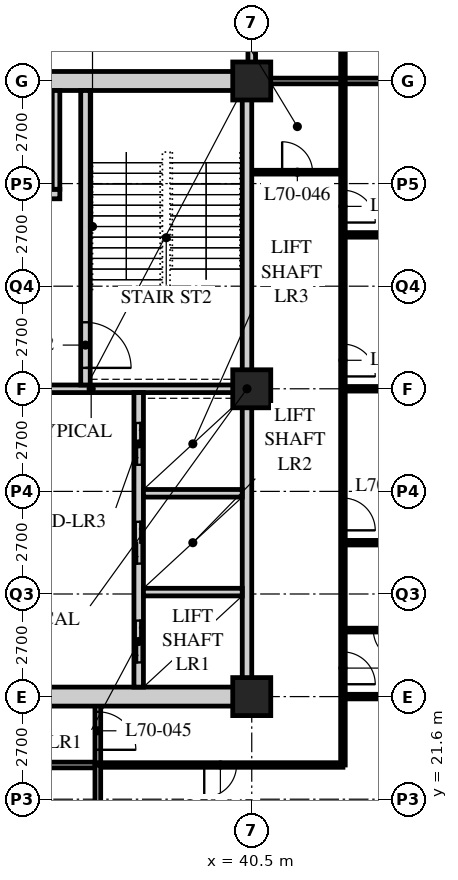
"""IFC4 building model, lengths in metres.
Left out: names, types, materials, properties, quantities, classifications, styles, units other than length and angle.
Written with IfcOpenShell. Run it as: python <this file> out.ifc"""

import sys

from ifc_helpers import new_model, si_unit, direction, frame, frame_2d, origin, origin_2d, place, context, subcontext, project, spatial, rectangle, hollow_rectangle, extrude, element, fill, save


model = new_model("IFC4")
c1 = context("Model", 3, precision=1e-05, world=origin(), true_north=direction((0.0, 1.0)))
c2 = subcontext(c1, "Body", "Model", "MODEL_VIEW")
j1 = project(units=[si_unit("LENGTHUNIT", "METRE"), si_unit("PLANEANGLEUNIT", "RADIAN")], contexts=[c1])
p1 = place(None, origin())
s1 = spatial("IfcSite", under=j1, at=p1, CompositionType="ELEMENT")
p2 = place(p1, origin())
s2 = spatial("IfcBuilding", under=s1, at=p2, CompositionType="ELEMENT")
p3 = place(p2, frame((0.0, 0.0, 273.6)))
s3 = spatial("IfcBuildingStorey", under=s2, at=p3, CompositionType="ELEMENT", Elevation=273.6)
for number, where, z_axis, x_axis in (
    (1, (40.5, 24.3, 0.0), (0.0, 0.0, 1.0), (1.0, 0.0, 0.0)),
    (2, (40.5, 32.4, 0.0), (0.0, 0.0, 1.0), (1.0, 0.0, 0.0)),
    (3, (40.5, 40.5, 0.0), (0.0, 0.0, 1.0), (1.0, 0.0, 0.0)),
):
    element("IfcColumn", number, at=place(p3, frame(where, z_axis=z_axis, x_axis=x_axis)), inside=s3, PredefinedType="COLUMN", context=c2, shape_type="SweptSolid", body=[
        extrude(hollow_rectangle(XDim=1.0, YDim=1.0, WallThickness=0.1, at=origin_2d()), origin(), (0.0, 0.0, 1.0), 3.9),
    ])
p4 = place(p3, frame((12.15, 22.5, 0.0), z_axis=(0.0, 0.0, 1.0), x_axis=(1.0, 0.0, 0.0)))
e4 = element("IfcWall", 4, at=p4, inside=s3, PredefinedType="PARTITIONING", context=c2, shape_type="SweptSolid", body=[
    extrude(rectangle(XDim=24.3, YDim=0.15, at=frame_2d((12.15, 0.0))), origin(), (0.0, 0.0, 1.0), 3.69),
])
p5 = place(p4, frame((4.45, 0.0, 0.0)))
e5 = element("IfcOpeningElement", 5, at=p5, cuts=e4, PredefinedType="OPENING", context=c2, shape_type="SweptSolid", body=[
    extrude(rectangle(XDim=1.0, YDim=2.1, at=frame_2d((0.5, 1.05))), frame((0.0, 0.085, 0.0), z_axis=(0.0, -1.0, 0.0), x_axis=(1.0, 0.0, 0.0)), (0.0, 0.0, 1.0), 0.17),
])
p6 = place(p4, frame((12.55, 0.0, 0.0)))
e6 = element("IfcOpeningElement", 6, at=p6, cuts=e4, PredefinedType="OPENING", context=c2, shape_type="SweptSolid", body=[
    extrude(rectangle(XDim=1.0, YDim=2.1, at=frame_2d((0.5, 1.05))), frame((0.0, 0.085, 0.0), z_axis=(0.0, -1.0, 0.0), x_axis=(1.0, 0.0, 0.0)), (0.0, 0.0, 1.0), 0.17),
])
p7 = place(p4, frame((2.625, 0.0, 0.0)))
e7 = element("IfcOpeningElement", 7, at=p7, cuts=e4, PredefinedType="OPENING", context=c2, shape_type="SweptSolid", body=[
    extrude(rectangle(XDim=1.0, YDim=2.1, at=frame_2d((0.5, 1.05))), frame((0.0, 0.085, 0.0), z_axis=(0.0, -1.0, 0.0), x_axis=(1.0, 0.0, 0.0)), (0.0, 0.0, 1.0), 0.17),
])
p8 = place(p3, frame((36.45, 22.5, 0.0), z_axis=(0.0, 0.0, 1.0), x_axis=(0.0, 1.0, 0.0)))
e8 = element("IfcWall", 8, at=p8, inside=s3, PredefinedType="PARTITIONING", context=c2, shape_type="SweptSolid", body=[
    extrude(rectangle(XDim=1.8, YDim=0.15, at=frame_2d((0.9, 0.0))), origin(), (0.0, 0.0, 1.0), 3.69),
])
p9 = place(p8, frame((0.4, 0.0, 0.0)))
e9 = element("IfcOpeningElement", 9, at=p9, cuts=e8, PredefinedType="OPENING", context=c2, shape_type="SweptSolid", body=[
    extrude(rectangle(XDim=1.0, YDim=2.1, at=frame_2d((0.5, 1.05))), frame((0.0, 0.085, 0.0), z_axis=(0.0, -1.0, 0.0), x_axis=(1.0, 0.0, 0.0)), (0.0, 0.0, 1.0), 0.17),
])
p10 = place(p3, frame((40.5, 40.5, 0.0), z_axis=(0.0, 0.0, 1.0), x_axis=(0.0, 1.0, 0.0)))
e10 = element("IfcWall", 10, at=p10, inside=s3, PredefinedType="SOLIDWALL", context=c2, shape_type="SweptSolid", body=[
    extrude(rectangle(XDim=10.35, YDim=0.2, at=frame_2d((5.175, 0.0))), origin(), (0.0, 0.0, 1.0), 3.078),
])
p11 = place(p3, frame((40.5, 38.1, 0.0), z_axis=(0.0, 0.0, 1.0), x_axis=(1.0, 0.0, 0.0)))
e11 = element("IfcWall", 11, at=p11, inside=s3, PredefinedType="PARTITIONING", context=c2, shape_type="SweptSolid", body=[
    extrude(rectangle(XDim=2.4, YDim=0.1, at=frame_2d((1.2, 0.0))), origin(), (0.0, 0.0, 1.0), 3.69),
])
p12 = place(p11, frame((0.8, 0.0, 0.0)))
e12 = element("IfcOpeningElement", 12, at=p12, cuts=e11, PredefinedType="OPENING", context=c2, shape_type="SweptSolid", body=[
    extrude(rectangle(XDim=0.8, YDim=2.1, at=frame_2d((0.4, 1.05))), frame((0.0, 0.06, 0.0), z_axis=(0.0, -1.0, 0.0), x_axis=(1.0, 0.0, 0.0)), (0.0, 0.0, 1.0), 0.12),
])
p13 = place(p3, frame((42.9, 22.5, 0.0), z_axis=(0.0, 0.0, 1.0), x_axis=(0.0, 1.0, 0.0)))
e13 = element("IfcWall", 13, at=p13, inside=s3, PredefinedType="PARTITIONING", context=c2, shape_type="SweptSolid", body=[
    extrude(rectangle(XDim=18.0, YDim=0.12, at=frame_2d((9.0, 0.0))), origin(), (0.0, 0.0, 1.0), 3.69),
])
p14 = place(p13, frame((2.125, 0.0, 0.0)))
e14 = element("IfcOpeningElement", 14, at=p14, cuts=e13, PredefinedType="OPENING", context=c2, shape_type="SweptSolid", body=[
    extrude(rectangle(XDim=0.85, YDim=2.1, at=frame_2d((0.425, 1.05))), frame((0.0, 0.07, 0.0), z_axis=(0.0, -1.0, 0.0), x_axis=(1.0, 0.0, 0.0)), (0.0, 0.0, 1.0), 0.14),
])
p15 = place(p13, frame((6.175, 0.0, 0.0)))
e15 = element("IfcOpeningElement", 15, at=p15, cuts=e13, PredefinedType="OPENING", context=c2, shape_type="SweptSolid", body=[
    extrude(rectangle(XDim=0.85, YDim=2.1, at=frame_2d((0.425, 1.05))), frame((0.0, 0.07, 0.0), z_axis=(0.0, -1.0, 0.0), x_axis=(1.0, 0.0, 0.0)), (0.0, 0.0, 1.0), 0.14),
])
p16 = place(p13, frame((10.225, 0.0, 0.0)))
e16 = element("IfcOpeningElement", 16, at=p16, cuts=e13, PredefinedType="OPENING", context=c2, shape_type="SweptSolid", body=[
    extrude(rectangle(XDim=0.85, YDim=2.1, at=frame_2d((0.425, 1.05))), frame((0.0, 0.07, 0.0), z_axis=(0.0, -1.0, 0.0), x_axis=(1.0, 0.0, 0.0)), (0.0, 0.0, 1.0), 0.14),
])
p17 = place(p13, frame((14.275, 0.0, 0.0)))
e17 = element("IfcOpeningElement", 17, at=p17, cuts=e13, PredefinedType="OPENING", context=c2, shape_type="SweptSolid", body=[
    extrude(rectangle(XDim=0.85, YDim=2.1, at=frame_2d((0.425, 1.05))), frame((0.0, 0.07, 0.0), z_axis=(0.0, -1.0, 0.0), x_axis=(1.0, 0.0, 0.0)), (0.0, 0.0, 1.0), 0.14),
])
p18 = place(p3, frame((36.45, 22.5, 0.0), z_axis=(0.0, 0.0, 1.0), x_axis=(1.0, 0.0, 0.0)))
e18 = element("IfcWall", 18, at=p18, inside=s3, PredefinedType="PARTITIONING", context=c2, shape_type="SweptSolid", body=[
    extrude(rectangle(XDim=6.45, YDim=0.12, at=frame_2d((3.225, 0.0))), origin(), (0.0, 0.0, 1.0), 3.69),
])
p19 = place(p18, frame((2.8, 0.0, 0.0)))
e19 = element("IfcOpeningElement", 19, at=p19, cuts=e18, PredefinedType="OPENING", context=c2, shape_type="SweptSolid", body=[
    extrude(rectangle(XDim=0.85, YDim=2.1, at=frame_2d((0.425, 1.05))), frame((0.0, 0.07, 0.0), z_axis=(0.0, -1.0, 0.0), x_axis=(1.0, 0.0, 0.0)), (0.0, 0.0, 1.0), 0.14),
])
p20 = place(p3, frame((42.9, 24.3, 0.0), z_axis=(0.0, 0.0, 1.0), x_axis=(1.0, 0.0, 0.0)))
e20 = element("IfcWall", 20, at=p20, inside=s3, PredefinedType="PARTITIONING", context=c2, shape_type="SweptSolid", body=[
    extrude(rectangle(XDim=9.45, YDim=0.12, at=frame_2d((4.725, 0.0))), origin(), (0.0, 0.0, 1.0), 3.078),
])
p21 = place(p3, frame((40.5, 40.5, 0.0), z_axis=(0.0, 0.0, 1.0), x_axis=(1.0, 0.0, 0.0)))
e21 = element("IfcWall", 21, at=p21, inside=s3, PredefinedType="PARTITIONING", context=c2, shape_type="SweptSolid", body=[
    extrude(rectangle(XDim=15.9, YDim=0.15, at=frame_2d((7.95, 0.0))), origin(), (0.0, 0.0, 1.0), 3.078),
])
p22 = place(p3, frame((36.45, 16.5, 0.0), z_axis=(0.0, 0.0, 1.0), x_axis=(0.0, 1.0, 0.0)))
e22 = element("IfcWall", 22, at=p22, inside=s3, PredefinedType="PARTITIONING", context=c2, shape_type="SweptSolid", body=[
    extrude(rectangle(XDim=6.0, YDim=0.15, at=frame_2d((3.0, 0.0))), origin(), (0.0, 0.0, 1.0), 3.69),
])
p23 = place(p3, frame((42.9, 26.05, 0.0), z_axis=(0.0, 0.0, 1.0), x_axis=(1.0, 0.0, 0.0)))
e23 = element("IfcWall", 23, at=p23, inside=s3, PredefinedType="PARTITIONING", context=c2, shape_type="SweptSolid", body=[
    extrude(rectangle(XDim=2.4, YDim=0.1, at=frame_2d((1.2, 0.0))), origin(), (0.0, 0.0, 1.0), 3.69),
])
p24 = place(p23, frame((0.8, 0.0, 0.0)))
e24 = element("IfcOpeningElement", 24, at=p24, cuts=e23, PredefinedType="OPENING", context=c2, shape_type="SweptSolid", body=[
    extrude(rectangle(XDim=0.8, YDim=2.1, at=frame_2d((0.4, 1.05))), frame((0.0, 0.06, 0.0), z_axis=(0.0, -1.0, 0.0), x_axis=(1.0, 0.0, 0.0)), (0.0, 0.0, 1.0), 0.12),
])
p25 = place(p3, frame((42.9, 28.35, 0.0), z_axis=(0.0, 0.0, 1.0), x_axis=(1.0, 0.0, 0.0)))
e25 = element("IfcWall", 25, at=p25, inside=s3, PredefinedType="PARTITIONING", context=c2, shape_type="SweptSolid", body=[
    extrude(rectangle(XDim=13.5, YDim=0.12, at=frame_2d((6.75, 0.0))), origin(), (0.0, 0.0, 1.0), 3.69),
])
p26 = place(p3, frame((42.9, 32.4, 0.0), z_axis=(0.0, 0.0, 1.0), x_axis=(1.0, 0.0, 0.0)))
e26 = element("IfcWall", 26, at=p26, inside=s3, PredefinedType="PARTITIONING", context=c2, shape_type="SweptSolid", body=[
    extrude(rectangle(XDim=13.5, YDim=0.12, at=frame_2d((6.75, 0.0))), origin(), (0.0, 0.0, 1.0), 3.078),
])
p27 = place(p3, frame((42.9, 36.45, 0.0), z_axis=(0.0, 0.0, 1.0), x_axis=(1.0, 0.0, 0.0)))
e27 = element("IfcWall", 27, at=p27, inside=s3, PredefinedType="PARTITIONING", context=c2, shape_type="SweptSolid", body=[
    extrude(rectangle(XDim=13.5, YDim=0.12, at=frame_2d((6.75, 0.0))), origin(), (0.0, 0.0, 1.0), 3.69),
])
p28 = place(p3, frame((42.9, 52.65, 0.0), z_axis=(0.0, 0.0, 1.0), x_axis=(0.0, -1.0, 0.0)))
e28 = element("IfcWall", 28, at=p28, inside=s3, PredefinedType="PARTITIONING", context=c2, shape_type="SweptSolid", body=[
    extrude(rectangle(XDim=12.15, YDim=0.12, at=frame_2d((6.075, 0.0))), origin(), (0.0, 0.0, 1.0), 3.69),
])
p29 = place(p28, frame((2.125, 0.0, 0.0)))
e29 = element("IfcOpeningElement", 29, at=p29, cuts=e28, PredefinedType="OPENING", context=c2, shape_type="SweptSolid", body=[
    extrude(rectangle(XDim=0.85, YDim=2.1, at=frame_2d((0.425, 1.05))), frame((0.0, 0.07, 0.0), z_axis=(0.0, -1.0, 0.0), x_axis=(1.0, 0.0, 0.0)), (0.0, 0.0, 1.0), 0.14),
])
p30 = place(p28, frame((8.425, 0.0, 0.0)))
e30 = element("IfcOpeningElement", 30, at=p30, cuts=e28, PredefinedType="OPENING", context=c2, shape_type="SweptSolid", body=[
    extrude(rectangle(XDim=0.85, YDim=2.1, at=frame_2d((0.425, 1.05))), frame((0.0, 0.07, 0.0), z_axis=(0.0, -1.0, 0.0), x_axis=(1.0, 0.0, 0.0)), (0.0, 0.0, 1.0), 0.14),
])
p31 = place(p3, frame((15.95, 24.3, 0.0), z_axis=(0.0, 0.0, 1.0), x_axis=(1.0, 0.0, 0.0)))
e31 = element("IfcWall", 31, at=p31, inside=s3, PredefinedType="SOLIDWALL", context=c2, shape_type="SweptSolid", body=[
    extrude(rectangle(XDim=24.55, YDim=0.5, at=frame_2d((12.275, 0.0))), origin(), (0.0, 0.0, 1.0), 3.04),
])
p32 = place(p31, frame((11.5, 0.0, 0.0)))
e32 = element("IfcOpeningElement", 32, at=p32, cuts=e31, PredefinedType="OPENING", context=c2, shape_type="SweptSolid", body=[
    extrude(rectangle(XDim=1.8, YDim=2.4, at=frame_2d((0.9, 1.2))), frame((0.0, 0.26, 0.0), z_axis=(0.0, -1.0, 0.0), x_axis=(1.0, 0.0, 0.0)), (0.0, 0.0, 1.0), 0.52),
])
p33 = place(p3, frame((15.95, 40.5, 0.0), z_axis=(0.0, 0.0, 1.0), x_axis=(1.0, 0.0, 0.0)))
e33 = element("IfcWall", 33, at=p33, inside=s3, PredefinedType="SOLIDWALL", context=c2, shape_type="SweptSolid", body=[
    extrude(rectangle(XDim=24.55, YDim=0.5, at=frame_2d((12.275, 0.0))), origin(), (0.0, 0.0, 1.0), 3.04),
])
p34 = place(p33, frame((11.5, 0.0, 0.0)))
e34 = element("IfcOpeningElement", 34, at=p34, cuts=e33, PredefinedType="OPENING", context=c2, shape_type="SweptSolid", body=[
    extrude(rectangle(XDim=1.8, YDim=2.4, at=frame_2d((0.9, 1.2))), frame((0.0, 0.26, 0.0), z_axis=(0.0, -1.0, 0.0), x_axis=(1.0, 0.0, 0.0)), (0.0, 0.0, 1.0), 0.52),
])
p35 = place(p3, frame((40.375, 24.55, 0.0), z_axis=(0.0, 0.0, 1.0), x_axis=(0.0, 1.0, 0.0)))
e35 = element("IfcWall", 35, at=p35, inside=s3, PredefinedType="SOLIDWALL", context=c2, shape_type="SweptSolid", body=[
    extrude(rectangle(XDim=15.7, YDim=0.25, at=frame_2d((7.85, 0.0))), origin(), (0.0, 0.0, 1.0), 3.078),
])
p36 = place(p3, frame((32.3, 32.4, 0.0), z_axis=(0.0, 0.0, 1.0), x_axis=(1.0, 0.0, 0.0)))
e36 = element("IfcWall", 36, at=p36, inside=s3, PredefinedType="SOLIDWALL", context=c2, shape_type="SweptSolid", body=[
    extrude(rectangle(XDim=7.95, YDim=0.2, at=frame_2d((3.975, 0.0))), origin(), (0.0, 0.0, 1.0), 3.078),
])
p37 = place(p3, frame((37.525, 24.55, 0.0), z_axis=(0.0, 0.0, 1.0), x_axis=(0.0, 1.0, 0.0)))
e37 = element("IfcWall", 37, at=p37, inside=s3, PredefinedType="SOLIDWALL", context=c2, shape_type="SweptSolid", body=[
    extrude(rectangle(XDim=7.75, YDim=0.25, at=frame_2d((3.875, 0.0))), origin(), (0.0, 0.0, 1.0), 3.69),
])
p38 = place(p37, frame((0.65, 0.0, 0.0)))
e38 = element("IfcOpeningElement", 38, at=p38, cuts=e37, PredefinedType="OPENING", context=c2, shape_type="SweptSolid", body=[
    extrude(rectangle(XDim=1.1, YDim=2.4, at=frame_2d((0.55, 1.2))), frame((0.0, 0.135, 0.0), z_axis=(0.0, -1.0, 0.0), x_axis=(1.0, 0.0, 0.0)), (0.0, 0.0, 1.0), 0.27),
])
p39 = place(p37, frame((3.25, 0.0, 0.0)))
e39 = element("IfcOpeningElement", 39, at=p39, cuts=e37, PredefinedType="OPENING", context=c2, shape_type="SweptSolid", body=[
    extrude(rectangle(XDim=1.1, YDim=2.4, at=frame_2d((0.55, 1.2))), frame((0.0, 0.135, 0.0), z_axis=(0.0, -1.0, 0.0), x_axis=(1.0, 0.0, 0.0)), (0.0, 0.0, 1.0), 0.27),
])
p40 = place(p37, frame((5.85, 0.0, 0.0)))
e40 = element("IfcOpeningElement", 40, at=p40, cuts=e37, PredefinedType="OPENING", context=c2, shape_type="SweptSolid", body=[
    extrude(rectangle(XDim=1.1, YDim=2.4, at=frame_2d((0.55, 1.2))), frame((0.0, 0.135, 0.0), z_axis=(0.0, -1.0, 0.0), x_axis=(1.0, 0.0, 0.0)), (0.0, 0.0, 1.0), 0.27),
])
for number, where, z_axis, x_axis in (
    (41, (37.65, 27.05, 0.0), (0.0, 0.0, 1.0), (1.0, 0.0, 0.0)),
    (42, (37.65, 29.65, 0.0), (0.0, 0.0, 1.0), (1.0, 0.0, 0.0)),
):
    element("IfcWall", number, at=place(p3, frame(where, z_axis=z_axis, x_axis=x_axis)), inside=s3, PredefinedType="SOLIDWALL", context=c2, shape_type="SweptSolid", body=[
        extrude(rectangle(XDim=2.6, YDim=0.2, at=frame_2d((1.3, 0.0))), origin(), (0.0, 0.0, 1.0), 3.69),
    ])
p41 = place(p3, frame((36.125, 32.5, 0.0), z_axis=(0.0, 0.0, 1.0), x_axis=(0.0, 1.0, 0.0)))
e43 = element("IfcWall", 43, at=p41, inside=s3, PredefinedType="SOLIDWALL", context=c2, shape_type="SweptSolid", body=[
    extrude(rectangle(XDim=7.75, YDim=0.25, at=frame_2d((3.875, 0.0))), origin(), (0.0, 0.0, 1.0), 3.69),
])
p42 = place(p41, frame((0.45, 0.0, 0.0)))
e44 = element("IfcOpeningElement", 44, at=p42, cuts=e43, PredefinedType="OPENING", context=c2, shape_type="SweptSolid", body=[
    extrude(rectangle(XDim=1.2, YDim=2.1, at=frame_2d((0.6, 1.05))), frame((0.0, 0.135, 0.0), z_axis=(0.0, -1.0, 0.0), x_axis=(1.0, 0.0, 0.0)), (0.0, 0.0, 1.0), 0.27),
])
p43 = place(p3, frame((32.5, 37.525, 0.0), z_axis=(0.0, 0.0, 1.0), x_axis=(1.0, 0.0, 0.0)))
e45 = element("IfcWall", 45, at=p43, inside=s3, PredefinedType="SOLIDWALL", context=c2, shape_type="SweptSolid", body=[
    extrude(rectangle(XDim=2.95, YDim=0.25, at=frame_2d((1.475, 0.0))), origin(), (0.0, 0.0, 1.0), 3.69),
])
p44 = place(p43, frame((0.9, 0.0, 0.0)))
e46 = element("IfcOpeningElement", 46, at=p44, cuts=e45, PredefinedType="OPENING", context=c2, shape_type="SweptSolid", body=[
    extrude(rectangle(XDim=1.1, YDim=2.4, at=frame_2d((0.55, 1.2))), frame((0.0, 0.135, 0.0), z_axis=(0.0, -1.0, 0.0), x_axis=(1.0, 0.0, 0.0)), (0.0, 0.0, 1.0), 0.27),
])
p45 = place(p3, frame((35.35, 37.65, 0.0), z_axis=(0.0, 0.0, 1.0), x_axis=(0.0, 1.0, 0.0)))
e47 = element("IfcWall", 47, at=p45, inside=s3, PredefinedType="SOLIDWALL", context=c2, shape_type="SweptSolid", body=[
    extrude(rectangle(XDim=2.6, YDim=0.2, at=frame_2d((1.3, 0.0))), origin(), (0.0, 0.0, 1.0), 3.69),
])
p46 = place(p9, origin())
e48 = element("IfcDoor", 48, at=p46, inside=s3, OperationType="SINGLE_SWING_RIGHT", PredefinedType="DOOR", context=c2, shape_type="SweptSolid", body=[
    extrude(rectangle(XDim=1.0, YDim=2.1, at=frame_2d((0.5, 1.05))), frame((0.0, 0.025, 0.0), z_axis=(0.0, -1.0, 0.0), x_axis=(1.0, 0.0, 0.0)), (0.0, 0.0, 1.0), 0.05),
])
fill(e9, e48)
p47 = place(p12, origin())
e49 = element("IfcDoor", 49, at=p47, inside=s3, OperationType="SINGLE_SWING_LEFT", PredefinedType="DOOR", context=c2, shape_type="SweptSolid", body=[
    extrude(rectangle(XDim=0.8, YDim=2.1, at=frame_2d((0.4, 1.05))), frame((0.0, 0.025, 0.0), z_axis=(0.0, -1.0, 0.0), x_axis=(1.0, 0.0, 0.0)), (0.0, 0.0, 1.0), 0.05),
])
fill(e12, e49)
p48 = place(p19, origin())
e50 = element("IfcDoor", 50, at=p48, inside=s3, OperationType="SINGLE_SWING_RIGHT", PredefinedType="DOOR", context=c2, shape_type="SweptSolid", body=[
    extrude(rectangle(XDim=0.85, YDim=2.1, at=frame_2d((0.425, 1.05))), frame((0.0, 0.025, 0.0), z_axis=(0.0, -1.0, 0.0), x_axis=(1.0, 0.0, 0.0)), (0.0, 0.0, 1.0), 0.05),
])
fill(e19, e50)
p49 = place(p24, origin())
e51 = element("IfcDoor", 51, at=p49, inside=s3, OperationType="SINGLE_SWING_LEFT", PredefinedType="DOOR", context=c2, shape_type="SweptSolid", body=[
    extrude(rectangle(XDim=0.8, YDim=2.1, at=frame_2d((0.4, 1.05))), frame((0.0, 0.025, 0.0), z_axis=(0.0, -1.0, 0.0), x_axis=(1.0, 0.0, 0.0)), (0.0, 0.0, 1.0), 0.05),
])
fill(e24, e51)
p50 = place(p14, origin())
e52 = element("IfcDoor", 52, at=p50, inside=s3, OperationType="SINGLE_SWING_RIGHT", PredefinedType="DOOR", context=c2, shape_type="SweptSolid", body=[
    extrude(rectangle(XDim=0.85, YDim=2.1, at=frame_2d((0.425, 1.05))), frame((0.0, 0.025, 0.0), z_axis=(0.0, -1.0, 0.0), x_axis=(1.0, 0.0, 0.0)), (0.0, 0.0, 1.0), 0.05),
])
fill(e14, e52)
p51 = place(p15, origin())
e53 = element("IfcDoor", 53, at=p51, inside=s3, OperationType="SINGLE_SWING_RIGHT", PredefinedType="DOOR", context=c2, shape_type="SweptSolid", body=[
    extrude(rectangle(XDim=0.85, YDim=2.1, at=frame_2d((0.425, 1.05))), frame((0.0, 0.025, 0.0), z_axis=(0.0, -1.0, 0.0), x_axis=(1.0, 0.0, 0.0)), (0.0, 0.0, 1.0), 0.05),
])
fill(e15, e53)
p52 = place(p16, origin())
e54 = element("IfcDoor", 54, at=p52, inside=s3, OperationType="SINGLE_SWING_RIGHT", PredefinedType="DOOR", context=c2, shape_type="SweptSolid", body=[
    extrude(rectangle(XDim=0.85, YDim=2.1, at=frame_2d((0.425, 1.05))), frame((0.0, 0.025, 0.0), z_axis=(0.0, -1.0, 0.0), x_axis=(1.0, 0.0, 0.0)), (0.0, 0.0, 1.0), 0.05),
])
fill(e16, e54)
p53 = place(p17, origin())
e55 = element("IfcDoor", 55, at=p53, inside=s3, OperationType="SINGLE_SWING_RIGHT", PredefinedType="DOOR", context=c2, shape_type="SweptSolid", body=[
    extrude(rectangle(XDim=0.85, YDim=2.1, at=frame_2d((0.425, 1.05))), frame((0.0, 0.025, 0.0), z_axis=(0.0, -1.0, 0.0), x_axis=(1.0, 0.0, 0.0)), (0.0, 0.0, 1.0), 0.05),
])
fill(e17, e55)
p54 = place(p42, origin())
e56 = element("IfcDoor", 56, at=p54, inside=s3, OperationType="SINGLE_SWING_RIGHT", PredefinedType="DOOR", context=c2, shape_type="SweptSolid", body=[
    extrude(rectangle(XDim=1.2, YDim=2.1, at=frame_2d((0.6, 1.05))), frame((0.0, 0.025, 0.0), z_axis=(0.0, -1.0, 0.0), x_axis=(1.0, 0.0, 0.0)), (0.0, 0.0, 1.0), 0.05),
])
fill(e44, e56)
p55 = place(p38, origin())
e57 = element("IfcDoor", 57, at=p55, inside=s3, OperationType="DOUBLE_DOOR_SLIDING", PredefinedType="DOOR", context=c2, shape_type="SweptSolid", body=[
    extrude(rectangle(XDim=1.1, YDim=2.4, at=frame_2d((0.55, 1.2))), frame((0.0, 0.025, 0.0), z_axis=(0.0, -1.0, 0.0), x_axis=(1.0, 0.0, 0.0)), (0.0, 0.0, 1.0), 0.05),
])
fill(e38, e57)
p56 = place(p39, origin())
e58 = element("IfcDoor", 58, at=p56, inside=s3, OperationType="DOUBLE_DOOR_SLIDING", PredefinedType="DOOR", context=c2, shape_type="SweptSolid", body=[
    extrude(rectangle(XDim=1.1, YDim=2.4, at=frame_2d((0.55, 1.2))), frame((0.0, 0.025, 0.0), z_axis=(0.0, -1.0, 0.0), x_axis=(1.0, 0.0, 0.0)), (0.0, 0.0, 1.0), 0.05),
])
fill(e39, e58)
p57 = place(p40, origin())
e59 = element("IfcDoor", 59, at=p57, inside=s3, OperationType="DOUBLE_DOOR_SLIDING", PredefinedType="DOOR", context=c2, shape_type="SweptSolid", body=[
    extrude(rectangle(XDim=1.1, YDim=2.4, at=frame_2d((0.55, 1.2))), frame((0.0, 0.025, 0.0), z_axis=(0.0, -1.0, 0.0), x_axis=(1.0, 0.0, 0.0)), (0.0, 0.0, 1.0), 0.05),
])
fill(e40, e59)
save(model, sys.argv[1])
